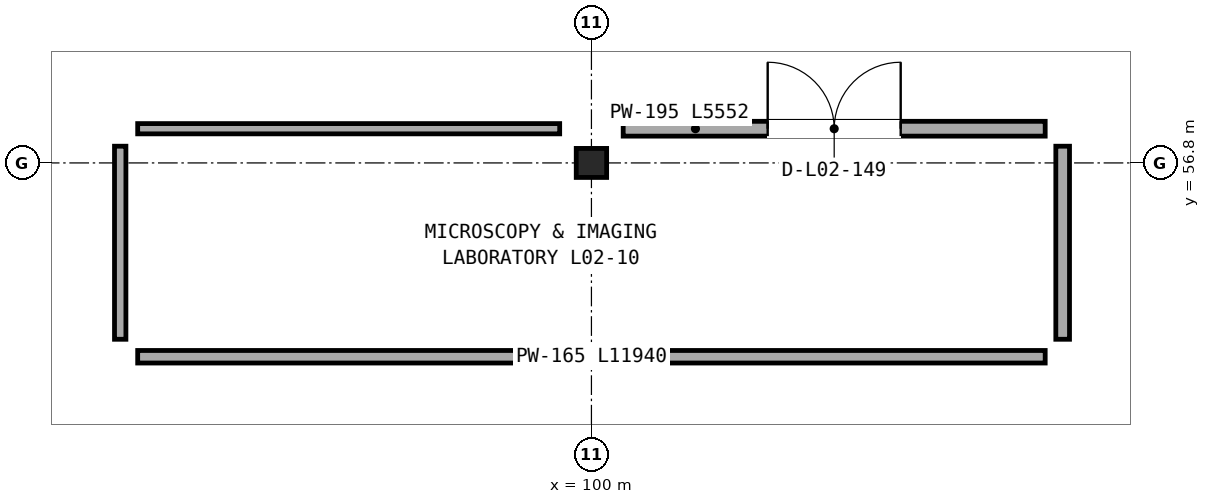
"""IFC4 building model, lengths in metres.
Left out: names, types, materials, properties, quantities, classifications, styles, units other than length and angle.
Written with IfcOpenShell. Run it as: python <this file> out.ifc"""

import sys

from ifc_helpers import new_model, si_unit, direction, frame, frame_2d, origin, origin_2d, place, context, subcontext, project, spatial, rectangle, i_section, extrude, element, fill, save


model = new_model("IFC4")
c1 = context("Model", 3, precision=1e-05, world=origin(), true_north=direction((0.0, 1.0)))
c2 = subcontext(c1, "Body", "Model", "MODEL_VIEW")
j1 = project(units=[si_unit("LENGTHUNIT", "METRE"), si_unit("PLANEANGLEUNIT", "RADIAN")], contexts=[c1])
p1 = place(None, origin())
s1 = spatial("IfcSite", under=j1, at=p1, CompositionType="ELEMENT")
p2 = place(p1, origin())
s2 = spatial("IfcBuilding", under=s1, at=p2, CompositionType="ELEMENT")
p3 = place(p2, frame((0.0, 0.0, 10.1)))
s3 = spatial("IfcBuildingStorey", under=s2, at=p3, CompositionType="ELEMENT", Elevation=10.1)
p4 = place(p3, frame((100.0, 56.8, 0.0), z_axis=(0.0, 0.0, 1.0), x_axis=(1.0, 0.0, 0.0)))
e1 = element("IfcColumn", 1, at=p4, inside=s3, PredefinedType="COLUMN", context=c2, shape_type="SweptSolid", body=[
    extrude(i_section(OverallWidth=0.4, OverallDepth=0.382, WebThickness=0.025, FlangeThickness=0.036, at=origin_2d()), origin(), (0.0, 0.0, 1.0), 4.5),
])
p5 = place(p3, frame((100.418, 57.25, 0.0), z_axis=(0.0, 0.0, 1.0), x_axis=(1.0, 0.0, 0.0)))
e2 = element("IfcWall", 2, at=p5, inside=s3, PredefinedType="PARTITIONING", context=c2, shape_type="SweptSolid", body=[
    extrude(rectangle(XDim=5.552, YDim=0.195, at=frame_2d((2.776, 0.0))), origin(), (0.0, 0.0, 1.0), 4.13),
])
p6 = place(p5, frame((1.901, 0.0, 0.0)))
e3 = element("IfcOpeningElement", 3, at=p6, cuts=e2, PredefinedType="OPENING", context=c2, shape_type="SweptSolid", body=[
    extrude(rectangle(XDim=1.75, YDim=2.58, at=frame_2d((0.875, 1.29))), frame((0.0, 0.107, 0.0), z_axis=(0.0, -1.0, 0.0), x_axis=(1.0, 0.0, 0.0)), (0.0, 0.0, 1.0), 0.215),
])
p7 = place(p3, frame((106.2, 57.02, 0.0), z_axis=(0.0, 0.0, 1.0), x_axis=(0.0, -1.0, 0.0)))
e4 = element("IfcWall", 4, at=p7, inside=s3, PredefinedType="PARTITIONING", context=c2, shape_type="SweptSolid", body=[
    extrude(rectangle(XDim=2.54, YDim=0.18, at=frame_2d((1.27, 0.0))), origin(), (0.0, 0.0, 1.0), 3.613),
])
p8 = place(p3, frame((105.97, 54.25, 0.0), z_axis=(0.0, 0.0, 1.0), x_axis=(-1.0, 0.0, 0.0)))
e5 = element("IfcWall", 5, at=p8, inside=s3, PredefinedType="PARTITIONING", context=c2, shape_type="SweptSolid", body=[
    extrude(rectangle(XDim=11.94, YDim=0.165, at=frame_2d((5.97, 0.0))), origin(), (0.0, 0.0, 1.0), 3.763),
])
p9 = place(p3, frame((93.8, 54.48, 0.0), z_axis=(0.0, 0.0, 1.0), x_axis=(0.0, 1.0, 0.0)))
e6 = element("IfcWall", 6, at=p9, inside=s3, PredefinedType="PARTITIONING", context=c2, shape_type="SweptSolid", body=[
    extrude(rectangle(XDim=2.54, YDim=0.15, at=frame_2d((1.27, 0.0))), origin(), (0.0, 0.0, 1.0), 3.613),
])
p10 = place(p3, frame((94.03, 57.25, 0.0), z_axis=(0.0, 0.0, 1.0), x_axis=(1.0, 0.0, 0.0)))
e7 = element("IfcWall", 7, at=p10, inside=s3, PredefinedType="PARTITIONING", context=c2, shape_type="SweptSolid", body=[
    extrude(rectangle(XDim=5.552, YDim=0.135, at=frame_2d((2.776, 0.0))), origin(), (0.0, 0.0, 1.0), 4.13),
])
p11 = place(p6, origin())
e8 = element("IfcDoor", 8, at=p11, inside=s3, OperationType="DOUBLE_DOOR_SINGLE_SWING", PredefinedType="DOOR", context=c2, shape_type="SweptSolid", body=[
    extrude(rectangle(XDim=1.75, YDim=2.58, at=frame_2d((0.875, 1.29))), frame((0.0, 0.025, 0.0), z_axis=(0.0, -1.0, 0.0), x_axis=(1.0, 0.0, 0.0)), (0.0, 0.0, 1.0), 0.05),
])
fill(e3, e8)
save(model, sys.argv[1])
